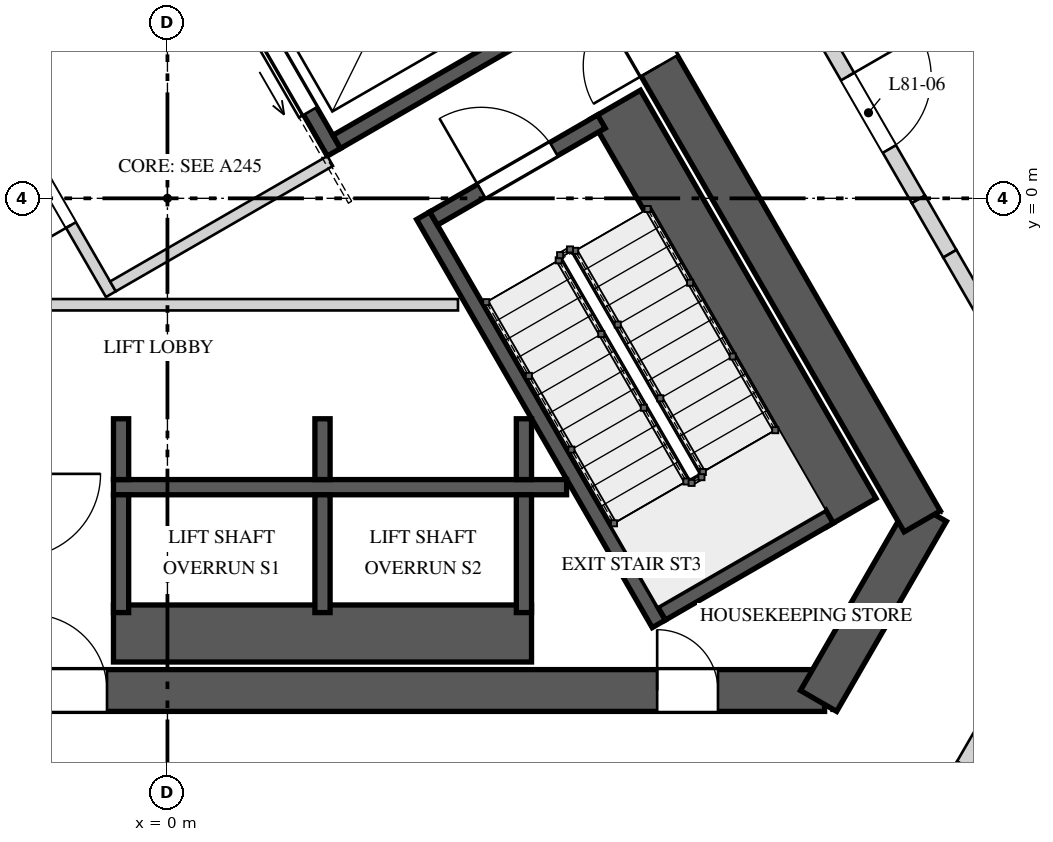
"""IFC4 building model, lengths in metres.
Left out: names, types, materials, properties, quantities, classifications, styles, units other than length and angle.
Written with IfcOpenShell. Run it as: python <this file> out.ifc"""

import sys

from ifc_helpers import new_model, si_unit, direction, frame, frame_2d, origin, place, context, subcontext, project, spatial, rectangle, extrude, element, fill, save


model = new_model("IFC4")
c1 = context("Model", 3, precision=1e-05, world=origin(), true_north=direction((0.0, 1.0)))
c2 = subcontext(c1, "Body", "Model", "MODEL_VIEW")
j1 = project(units=[si_unit("LENGTHUNIT", "METRE"), si_unit("PLANEANGLEUNIT", "RADIAN")], contexts=[c1])
p1 = place(None, origin())
s1 = spatial("IfcSite", under=j1, at=p1, CompositionType="ELEMENT")
p2 = place(p1, origin())
s2 = spatial("IfcBuilding", under=s1, at=p2, CompositionType="ELEMENT")
p3 = place(p2, frame((0.0, 0.0, 352.4)))
s3 = spatial("IfcBuildingStorey", under=s2, at=p3, CompositionType="ELEMENT", Elevation=352.4)
p4 = place(p3, frame((-1.285, 10.725, 0.0), z_axis=(0.0, 0.0, 1.0), x_axis=(-0.499994590896, -0.86602852671, 0.0)))
e1 = element("IfcWall", 1, at=p4, inside=s3, PredefinedType="SHEAR", context=c2, shape_type="SweptSolid", body=[
    extrude(rectangle(XDim=17.292, YDim=0.55, at=frame_2d((8.646, 0.0))), origin(), (0.0, 0.0, 1.0), 4.5),
])
p5 = place(p4, frame((6.851, 0.0, 0.0)))
e2 = element("IfcOpeningElement", 2, at=p5, cuts=e1, PredefinedType="OPENING", context=c2, shape_type="SweptSolid", body=[
    extrude(rectangle(XDim=1.0, YDim=2.4, at=frame_2d((0.5, 1.2))), frame((0.0, 0.285, 0.0), z_axis=(0.0, -1.0, 0.0), x_axis=(1.0, 0.0, 0.0)), (0.0, 0.0, 1.0), 0.57),
])
p6 = place(p3, frame((-8.646, -6.475, 0.0), z_axis=(0.0, 0.0, 1.0), x_axis=(1.0, 0.0, 0.0)))
e3 = element("IfcWall", 3, at=p6, inside=s3, PredefinedType="SHEAR", context=c2, shape_type="SweptSolid", body=[
    extrude(rectangle(XDim=17.292, YDim=0.55, at=frame_2d((8.646, 0.0))), origin(), (0.0, 0.0, 1.0), 4.5),
])
p7 = place(p6, frame((6.851, 0.0, 0.0)))
e4 = element("IfcOpeningElement", 4, at=p7, cuts=e3, PredefinedType="OPENING", context=c2, shape_type="SweptSolid", body=[
    extrude(rectangle(XDim=1.0, YDim=2.4, at=frame_2d((0.5, 1.2))), frame((0.0, 0.285, 0.0), z_axis=(0.0, -1.0, 0.0), x_axis=(1.0, 0.0, 0.0)), (0.0, 0.0, 1.0), 0.57),
])
p8 = place(p6, frame((15.089, 0.0, 0.0)))
e5 = element("IfcOpeningElement", 5, at=p8, cuts=e3, PredefinedType="OPENING", context=c2, shape_type="SweptSolid", body=[
    extrude(rectangle(XDim=0.8, YDim=2.1, at=frame_2d((0.4, 1.05))), frame((0.0, 0.285, 0.0), z_axis=(0.0, -1.0, 0.0), x_axis=(1.0, 0.0, 0.0)), (0.0, 0.0, 1.0), 0.57),
])
p9 = place(p3, frame((8.566, -6.613, 0.0), z_axis=(0.0, 0.0, 1.0), x_axis=(0.499995765644, 0.866027848477, 0.0)))
e6 = element("IfcWall", 6, at=p9, inside=s3, PredefinedType="SHEAR", context=c2, shape_type="SweptSolid", body=[
    extrude(rectangle(XDim=2.887, YDim=0.55, at=frame_2d((1.443, 0.0))), origin(), (0.0, 0.0, 1.0), 4.5),
])
p10 = place(p3, frame((9.93, -4.25, 0.0), z_axis=(0.0, 0.0, 1.0), x_axis=(-0.499994590896, 0.86602852671, 0.0)))
e7 = element("IfcWall", 7, at=p10, inside=s3, PredefinedType="SHEAR", context=c2, shape_type="SweptSolid", body=[
    extrude(rectangle(XDim=17.292, YDim=0.55, at=frame_2d((8.646, 0.0))), origin(), (0.0, 0.0, 1.0), 4.5),
])
p11 = place(p10, frame((6.921, 0.0, 0.0)))
e8 = element("IfcOpeningElement", 8, at=p11, cuts=e7, PredefinedType="OPENING", context=c2, shape_type="SweptSolid", body=[
    extrude(rectangle(XDim=1.0, YDim=2.4, at=frame_2d((0.5, 1.2))), frame((0.0, 0.285, 0.0), z_axis=(0.0, -1.0, 0.0), x_axis=(1.0, 0.0, 0.0)), (0.0, 0.0, 1.0), 0.57),
])
p12 = place(p10, frame((14.626, 0.0, 0.0)))
e9 = element("IfcOpeningElement", 9, at=p12, cuts=e7, PredefinedType="OPENING", context=c2, shape_type="SweptSolid", body=[
    extrude(rectangle(XDim=0.8, YDim=2.1, at=frame_2d((0.4, 1.05))), frame((0.0, 0.285, 0.0), z_axis=(0.0, -1.0, 0.0), x_axis=(1.0, 0.0, 0.0)), (0.0, 0.0, 1.0), 0.57),
])
p13 = place(p3, frame((8.998, -4.135, 0.0), z_axis=(0.0, 0.0, 1.0), x_axis=(-0.500009909098, 0.866019682689, 0.0)))
e10 = element("IfcWall", 10, at=p13, inside=s3, PredefinedType="SOLIDWALL", context=c2, shape_type="SweptSolid", body=[
    extrude(rectangle(XDim=6.2, YDim=0.75, at=frame_2d((3.1, 0.0))), origin(), (0.0, 0.0, 1.0), 4.15),
])
p14 = place(p3, frame((6.465, -5.597, 0.0), z_axis=(0.0, 0.0, 1.0), x_axis=(-0.49998037582, 0.866036733513, 0.0)))
e11 = element("IfcWall", 11, at=p14, inside=s3, PredefinedType="SOLIDWALL", context=c2, shape_type="SweptSolid", body=[
    extrude(rectangle(XDim=6.2, YDim=0.2, at=frame_2d((3.1, 0.0))), origin(), (0.0, 0.0, 1.0), 4.15),
])
p15 = place(p3, frame((6.501, -5.461, 0.0), z_axis=(0.0, 0.0, 1.0), x_axis=(0.865989465428, 0.500062241894, 0.0)))
e12 = element("IfcWall", 12, at=p15, inside=s3, PredefinedType="SOLIDWALL", context=c2, shape_type="SweptSolid", body=[
    extrude(rectangle(XDim=2.55, YDim=0.2, at=frame_2d((1.275, 0.0))), origin(), (0.0, 0.0, 1.0), 4.15),
])
p16 = place(p3, frame((3.501, -0.265, 0.0), z_axis=(0.0, 0.0, 1.0), x_axis=(0.866030925526, 0.499990435942, 0.0)))
e13 = element("IfcWall", 13, at=p16, inside=s3, PredefinedType="SOLIDWALL", context=c2, shape_type="SweptSolid", body=[
    extrude(rectangle(XDim=2.55, YDim=0.2, at=frame_2d((1.275, 0.0))), origin(), (0.0, 0.0, 1.0), 4.15),
])
p17 = place(p16, frame((0.725, 0.0, 0.0)))
e14 = element("IfcOpeningElement", 14, at=p17, cuts=e13, PredefinedType="OPENING", context=c2, shape_type="SweptSolid", body=[
    extrude(rectangle(XDim=1.1, YDim=2.4, at=frame_2d((0.55, 1.2))), frame((0.0, 0.11, 0.0), z_axis=(0.0, -1.0, 0.0), x_axis=(1.0, 0.0, 0.0)), (0.0, 0.0, 1.0), 0.22),
])
p18 = place(p3, frame((-0.71, -3.8, 0.0), z_axis=(0.0, 0.0, 1.0), x_axis=(1.0, 0.0, 0.0)))
e15 = element("IfcWall", 15, at=p18, inside=s3, PredefinedType="SOLIDWALL", context=c2, shape_type="SweptSolid", body=[
    extrude(rectangle(XDim=5.961, YDim=0.2, at=frame_2d((2.981, 0.0))), origin(), (0.0, 0.0, 1.0), 4.15),
])
p19 = place(p3, frame((-0.71, -5.725, 0.0), z_axis=(0.0, 0.0, 1.0), x_axis=(1.0, 0.0, 0.0)))
e16 = element("IfcWall", 16, at=p19, inside=s3, PredefinedType="SOLIDWALL", context=c2, shape_type="SweptSolid", body=[
    extrude(rectangle(XDim=5.5, YDim=0.75, at=frame_2d((2.75, 0.0))), origin(), (0.0, 0.0, 1.0), 4.15),
])
p20 = place(p3, frame((-0.61, -3.9, 0.0), z_axis=(0.0, 0.0, 1.0), x_axis=(0.0, -1.0, 0.0)))
e17 = element("IfcWall", 17, at=p20, inside=s3, PredefinedType="SOLIDWALL", context=c2, shape_type="SweptSolid", body=[
    extrude(rectangle(XDim=1.55, YDim=0.2, at=frame_2d((0.775, 0.0))), origin(), (0.0, 0.0, 1.0), 4.15),
])
p21 = place(p3, frame((-0.61, -2.9, 0.0), z_axis=(0.0, 0.0, 1.0), x_axis=(0.0, -1.0, 0.0)))
e18 = element("IfcWall", 18, at=p21, inside=s3, PredefinedType="SOLIDWALL", context=c2, shape_type="SweptSolid", body=[
    extrude(rectangle(XDim=0.8, YDim=0.2, at=frame_2d((0.4, 0.0))), origin(), (0.0, 0.0, 1.0), 4.15),
])
p22 = place(p3, frame((2.04, -3.9, 0.0), z_axis=(0.0, 0.0, 1.0), x_axis=(0.0, -1.0, 0.0)))
e19 = element("IfcWall", 19, at=p22, inside=s3, PredefinedType="SOLIDWALL", context=c2, shape_type="SweptSolid", body=[
    extrude(rectangle(XDim=1.55, YDim=0.2, at=frame_2d((0.775, 0.0))), origin(), (0.0, 0.0, 1.0), 4.15),
])
p23 = place(p3, frame((2.04, -2.9, 0.0), z_axis=(0.0, 0.0, 1.0), x_axis=(0.0, -1.0, 0.0)))
e20 = element("IfcWall", 20, at=p23, inside=s3, PredefinedType="SOLIDWALL", context=c2, shape_type="SweptSolid", body=[
    extrude(rectangle(XDim=0.8, YDim=0.2, at=frame_2d((0.4, 0.0))), origin(), (0.0, 0.0, 1.0), 4.15),
])
p24 = place(p3, frame((4.69, -3.9, 0.0), z_axis=(0.0, 0.0, 1.0), x_axis=(0.0, -1.0, 0.0)))
e21 = element("IfcWall", 21, at=p24, inside=s3, PredefinedType="SOLIDWALL", context=c2, shape_type="SweptSolid", body=[
    extrude(rectangle(XDim=1.55, YDim=0.2, at=frame_2d((0.775, 0.0))), origin(), (0.0, 0.0, 1.0), 4.15),
])
p25 = place(p3, frame((4.69, -2.9, 0.0), z_axis=(0.0, 0.0, 1.0), x_axis=(0.0, -1.0, 0.0)))
e22 = element("IfcWall", 22, at=p25, inside=s3, PredefinedType="SOLIDWALL", context=c2, shape_type="SweptSolid", body=[
    extrude(rectangle(XDim=0.8, YDim=0.2, at=frame_2d((0.4, 0.0))), origin(), (0.0, 0.0, 1.0), 4.15),
])
p26 = place(p3, frame((2.19, 0.606, 0.0), z_axis=(0.0, 0.0, 1.0), x_axis=(-0.500002801628, 0.866023786258, 0.0)))
e23 = element("IfcWall", 23, at=p26, inside=s3, PredefinedType="SOLIDWALL", context=c2, shape_type="SweptSolid", body=[
    extrude(rectangle(XDim=4.9, YDim=0.2, at=frame_2d((2.45, 0.0))), origin(), (0.0, 0.0, 1.0), 4.15),
])
p27 = place(p26, frame((0.625, 0.0, 0.0)))
e24 = element("IfcOpeningElement", 24, at=p27, cuts=e23, PredefinedType="OPENING", context=c2, shape_type="SweptSolid", body=[
    extrude(rectangle(XDim=1.3, YDim=2.1, at=frame_2d((0.65, 1.05))), frame((0.0, 0.11, 0.0), z_axis=(0.0, -1.0, 0.0), x_axis=(1.0, 0.0, 0.0)), (0.0, 0.0, 1.0), 0.22),
])
p28 = place(p26, frame((2.975, 0.0, 0.0)))
e25 = element("IfcOpeningElement", 25, at=p28, cuts=e23, PredefinedType="OPENING", context=c2, shape_type="SweptSolid", body=[
    extrude(rectangle(XDim=1.3, YDim=2.1, at=frame_2d((0.65, 1.05))), frame((0.0, 0.11, 0.0), z_axis=(0.0, -1.0, 0.0), x_axis=(1.0, 0.0, 0.0)), (0.0, 0.0, 1.0), 0.22),
])
p29 = place(p3, frame((2.227, 0.743, 0.0), z_axis=(0.0, 0.0, 1.0), x_axis=(0.866035871367, 0.499981869177, 0.0)))
e26 = element("IfcWall", 26, at=p29, inside=s3, PredefinedType="SOLIDWALL", context=c2, shape_type="SweptSolid", body=[
    extrude(rectangle(XDim=3.15, YDim=0.2, at=frame_2d((1.575, 0.0))), origin(), (0.0, 0.0, 1.0), 4.15),
])
p30 = place(p3, frame((-0.744, -1.261, 0.0), z_axis=(0.0, 0.0, 1.0), x_axis=(-0.500004234368, 0.866022959057, 0.0)))
e27 = element("IfcWall", 27, at=p30, inside=s3, PredefinedType="PARTITIONING", context=c2, shape_type="SweptSolid", body=[
    extrude(rectangle(XDim=3.125, YDim=0.15, at=frame_2d((1.562, 0.0))), origin(), (0.0, 0.0, 1.0), 4.15),
])
p31 = place(p30, frame((1.05, 0.0, 0.0)))
e28 = element("IfcOpeningElement", 28, at=p31, cuts=e27, PredefinedType="OPENING", context=c2, shape_type="SweptSolid", body=[
    extrude(rectangle(XDim=1.1, YDim=2.4, at=frame_2d((0.55, 1.2))), frame((0.0, 0.085, 0.0), z_axis=(0.0, -1.0, 0.0), x_axis=(1.0, 0.0, 0.0)), (0.0, 0.0, 1.0), 0.17),
])
p32 = place(p3, frame((-0.717, -1.159, 0.0), z_axis=(0.0, 0.0, 1.0), x_axis=(0.866008176907, 0.50002983664, 0.0)))
e29 = element("IfcWall", 29, at=p32, inside=s3, PredefinedType="PARTITIONING", context=c2, shape_type="SweptSolid", body=[
    extrude(rectangle(XDim=3.3, YDim=0.15, at=frame_2d((1.65, 0.0))), origin(), (0.0, 0.0, 1.0), 4.15),
])
p33 = place(p3, frame((-2.178, 1.372, 0.0), z_axis=(0.0, 0.0, 1.0), x_axis=(0.258808958833, 0.96592852884, 0.0)))
e30 = element("IfcWall", 30, at=p33, inside=s3, PredefinedType="PARTITIONING", context=c2, shape_type="SweptSolid", body=[
    extrude(rectangle(XDim=2.903, YDim=0.15, at=frame_2d((1.451, 0.0))), origin(), (0.0, 0.0, 1.0), 4.15),
])
p34 = place(p3, frame((-4.053, -1.4, 0.0), z_axis=(0.0, 0.0, 1.0), x_axis=(1.0, 0.0, 0.0)))
e31 = element("IfcWall", 31, at=p34, inside=s3, PredefinedType="PARTITIONING", context=c2, shape_type="SweptSolid", body=[
    extrude(rectangle(XDim=7.876, YDim=0.15, at=frame_2d((3.938, 0.0))), origin(), (0.0, 0.0, 1.0), 4.15),
])
p35 = place(p3, frame((10.825, -6.851, 0.0), z_axis=(0.0, 0.0, 1.0), x_axis=(-0.500144223137, -0.865942120504, 0.0)))
e32 = element("IfcWall", 32, at=p35, inside=s3, PredefinedType="SOLIDWALL", context=c2, shape_type="SweptSolid", body=[
    extrude(rectangle(XDim=0.701, YDim=0.2, at=frame_2d((0.351, 0.0))), origin(), (0.0, 0.0, 1.0), 3.45),
])
p36 = place(p3, frame((10.474, -7.458, 0.0), z_axis=(0.0, 0.0, 1.0), x_axis=(-0.499929168788, -0.866066294342, 0.0)))
e33 = element("IfcWall", 33, at=p36, inside=s3, PredefinedType="SOLIDWALL", context=c2, shape_type="SweptSolid", body=[
    extrude(rectangle(XDim=1.261, YDim=0.2, at=frame_2d((0.63, 0.0))), origin(), (0.0, 0.0, 1.0), 4.15),
])
p37 = place(p3, frame((8.169, 2.951, 0.0), z_axis=(0.0, 0.0, 1.0), x_axis=(0.499959115548, -0.866049007147, 0.0)))
e34 = element("IfcWall", 34, at=p37, inside=s3, PredefinedType="SOLIDWALL", context=c2, shape_type="SweptSolid", body=[
    extrude(rectangle(XDim=3.423, YDim=0.2, at=frame_2d((1.711, 0.0))), origin(), (0.0, 0.0, 1.0), 4.15),
])
p38 = place(p37, frame((1.558, 0.0, 0.0)))
e35 = element("IfcOpeningElement", 35, at=p38, cuts=e34, PredefinedType="OPENING", context=c2, shape_type="SweptSolid", body=[
    extrude(rectangle(XDim=1.1, YDim=2.4, at=frame_2d((0.55, 1.2))), frame((0.0, 0.11, 0.0), z_axis=(0.0, -1.0, 0.0), x_axis=(1.0, 0.0, 0.0)), (0.0, 0.0, 1.0), 0.22),
])
p39 = place(p3, frame((9.88, -0.013, 0.0), z_axis=(0.0, 0.0, 1.0), x_axis=(0.499952654668, -0.866052736899, 0.0)))
e36 = element("IfcWall", 36, at=p39, inside=s3, PredefinedType="SOLIDWALL", context=c2, shape_type="SweptSolid", body=[
    extrude(rectangle(XDim=0.826, YDim=0.2, at=frame_2d((0.413, 0.0))), origin(), (0.0, 0.0, 1.0), 3.45),
])
p40 = place(p3, frame((10.293, -0.729, 0.0), z_axis=(0.0, 0.0, 1.0), x_axis=(0.50002046505, -0.86601358796, 0.0)))
e37 = element("IfcWall", 37, at=p40, inside=s3, PredefinedType="SOLIDWALL", context=c2, shape_type="SweptSolid", body=[
    extrude(rectangle(XDim=4.066, YDim=0.2, at=frame_2d((2.033, 0.0))), origin(), (0.0, 0.0, 1.0), 4.15),
])
p41 = place(p17, origin())
e38 = element("IfcDoor", 38, at=p41, inside=s3, OperationType="SINGLE_SWING_RIGHT", PredefinedType="DOOR", context=c2, shape_type="SweptSolid", body=[
    extrude(rectangle(XDim=1.1, YDim=2.4, at=frame_2d((0.55, 1.2))), frame((0.0, 0.025, 0.0), z_axis=(0.0, -1.0, 0.0), x_axis=(1.0, 0.0, 0.0)), (0.0, 0.0, 1.0), 0.05),
])
fill(e14, e38)
p42 = place(p27, origin())
e39 = element("IfcDoor", 39, at=p42, inside=s3, OperationType="SLIDING_TO_LEFT", PredefinedType="DOOR", context=c2, shape_type="SweptSolid", body=[
    extrude(rectangle(XDim=1.3, YDim=2.1, at=frame_2d((0.65, 1.05))), frame((0.0, 0.025, 0.0), z_axis=(0.0, -1.0, 0.0), x_axis=(1.0, 0.0, 0.0)), (0.0, 0.0, 1.0), 0.05),
])
fill(e24, e39)
p43 = place(p31, origin())
e40 = element("IfcDoor", 40, at=p43, inside=s3, OperationType="SINGLE_SWING_LEFT", PredefinedType="DOOR", context=c2, shape_type="SweptSolid", body=[
    extrude(rectangle(XDim=1.1, YDim=2.4, at=frame_2d((0.55, 1.2))), frame((0.0, 0.025, 0.0), z_axis=(0.0, -1.0, 0.0), x_axis=(1.0, 0.0, 0.0)), (0.0, 0.0, 1.0), 0.05),
])
fill(e28, e40)
p44 = place(p7, origin())
e41 = element("IfcDoor", 41, at=p44, inside=s3, OperationType="SINGLE_SWING_LEFT", PredefinedType="DOOR", context=c2, shape_type="SweptSolid", body=[
    extrude(rectangle(XDim=1.0, YDim=2.4, at=frame_2d((0.5, 1.2))), frame((0.0, 0.025, 0.0), z_axis=(0.0, -1.0, 0.0), x_axis=(1.0, 0.0, 0.0)), (0.0, 0.0, 1.0), 0.05),
])
fill(e4, e41)
p45 = place(p11, origin())
e42 = element("IfcDoor", 42, at=p45, inside=s3, OperationType="SINGLE_SWING_RIGHT", PredefinedType="DOOR", context=c2, shape_type="SweptSolid", body=[
    extrude(rectangle(XDim=1.0, YDim=2.4, at=frame_2d((0.5, 1.2))), frame((0.0, 0.025, 0.0), z_axis=(0.0, -1.0, 0.0), x_axis=(1.0, 0.0, 0.0)), (0.0, 0.0, 1.0), 0.05),
])
fill(e8, e42)
p46 = place(p8, origin())
e43 = element("IfcDoor", 43, at=p46, inside=s3, OperationType="SINGLE_SWING_LEFT", PredefinedType="DOOR", context=c2, shape_type="SweptSolid", body=[
    extrude(rectangle(XDim=0.8, YDim=2.1, at=frame_2d((0.4, 1.05))), frame((0.0, 0.025, 0.0), z_axis=(0.0, -1.0, 0.0), x_axis=(1.0, 0.0, 0.0)), (0.0, 0.0, 1.0), 0.05),
])
fill(e5, e43)
p47 = place(p38, origin())
e44 = element("IfcDoor", 44, at=p47, inside=s3, OperationType="SINGLE_SWING_RIGHT", PredefinedType="DOOR", context=c2, shape_type="SweptSolid", body=[
    extrude(rectangle(XDim=1.1, YDim=2.4, at=frame_2d((0.55, 1.2))), frame((0.0, 0.025, 0.0), z_axis=(0.0, -1.0, 0.0), x_axis=(1.0, 0.0, 0.0)), (0.0, 0.0, 1.0), 0.05),
])
fill(e35, e44)
save(model, sys.argv[1])
